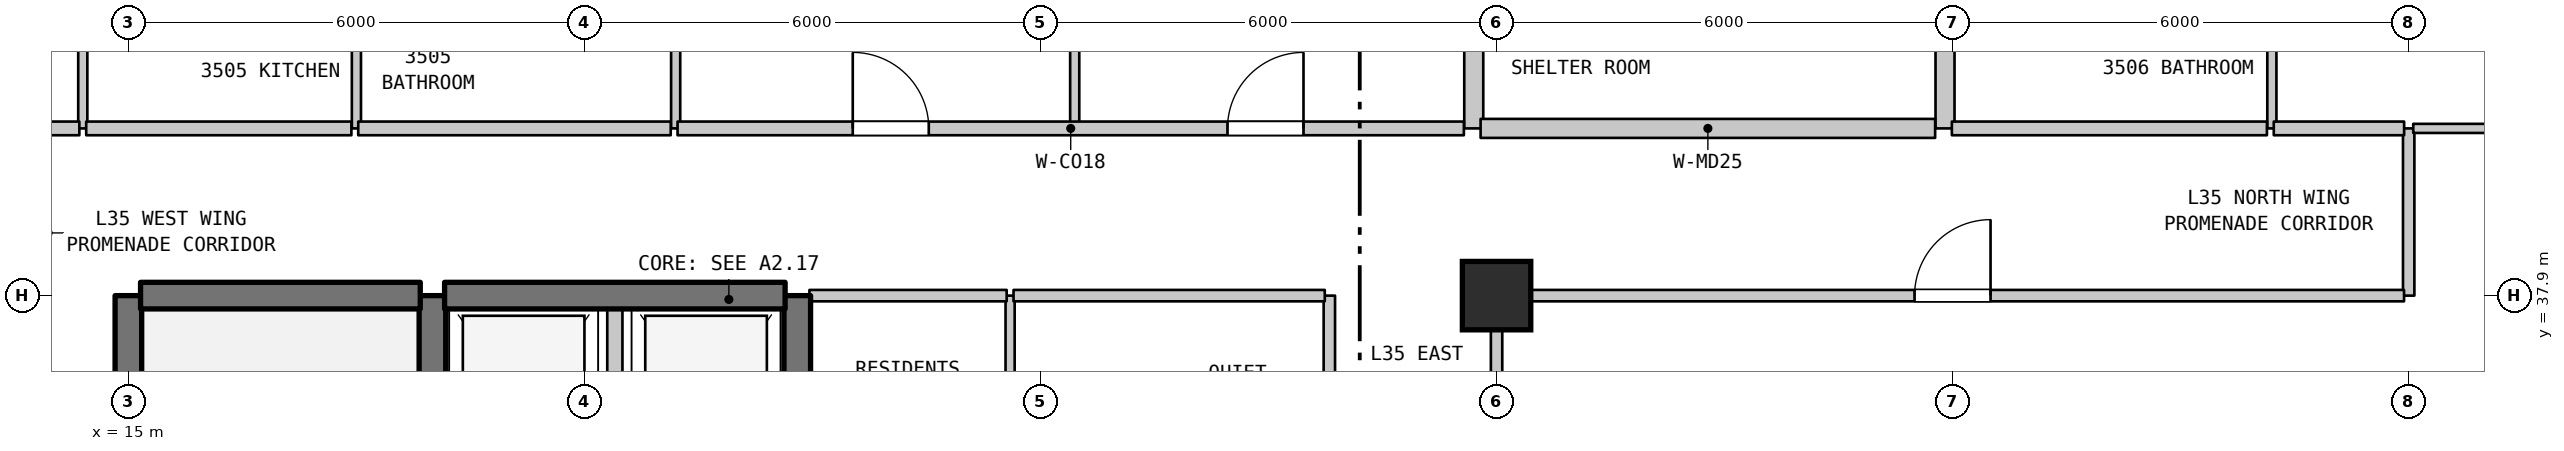
"""IFC4 building model, lengths in metres.
Left out: names, types, materials, properties, quantities, classifications, styles, units other than length and angle.
Written with IfcOpenShell. Run it as: python <this file> out.ifc"""

import sys

from ifc_helpers import new_model, si_unit, direction, frame, frame_2d, origin, origin_2d, place, context, subcontext, project, spatial, rectangle, extrude, element, fill, save


model = new_model("IFC4")
c1 = context("Model", 3, precision=1e-05, world=origin(), true_north=direction((0.0, 1.0)))
c2 = subcontext(c1, "Body", "Model", "MODEL_VIEW")
j1 = project(units=[si_unit("LENGTHUNIT", "METRE"), si_unit("PLANEANGLEUNIT", "RADIAN")], contexts=[c1])
p1 = place(None, origin())
s1 = spatial("IfcSite", under=j1, at=p1, CompositionType="ELEMENT")
p2 = place(p1, origin())
s2 = spatial("IfcBuilding", under=s1, at=p2, CompositionType="ELEMENT")
p3 = place(p2, frame((0.0, 0.0, 144.6)))
s3 = spatial("IfcBuildingStorey", under=s2, at=p3, CompositionType="ELEMENT", Elevation=144.6)
p4 = place(p3, frame((33.0, 37.9, 0.0), z_axis=(0.0, 0.0, 1.0), x_axis=(1.0, 0.0, 0.0)))
e1 = element("IfcColumn", 1, at=p4, inside=s3, PredefinedType="COLUMN", context=c2, shape_type="SweptSolid", body=[
    extrude(rectangle(XDim=0.9, YDim=0.9, at=origin_2d()), origin(), (0.0, 0.0, 1.0), 3.7),
])
p5 = place(p3, frame((14.4, 40.1, 0.0), z_axis=(0.0, 0.0, 1.0), x_axis=(0.0, 1.0, 0.0)))
e2 = element("IfcWall", 2, at=p5, inside=s3, PredefinedType="PARTITIONING", context=c2, shape_type="SweptSolid", body=[
    extrude(rectangle(XDim=2.3, YDim=0.12, at=frame_2d((1.15, 0.0))), origin(), (0.0, 0.0, 1.0), 3.385),
])
p6 = place(p3, frame((15.0, 31.1, 0.0), z_axis=(0.0, 0.0, 1.0), x_axis=(0.0, 1.0, 0.0)))
e3 = element("IfcWall", 3, at=p6, inside=s3, PredefinedType="SHEAR", context=c2, shape_type="SweptSolid", body=[
    extrude(rectangle(XDim=6.8, YDim=0.35, at=frame_2d((3.4, 0.0))), origin(), (0.0, 0.0, 1.0), 3.385),
])
p7 = place(p3, frame((18.0, 40.1, 0.0), z_axis=(0.0, 0.0, 1.0), x_axis=(0.0, 1.0, 0.0)))
e4 = element("IfcWall", 4, at=p7, inside=s3, PredefinedType="PARTITIONING", context=c2, shape_type="SweptSolid", body=[
    extrude(rectangle(XDim=2.3, YDim=0.12, at=frame_2d((1.15, 0.0))), origin(), (0.0, 0.0, 1.0), 3.385),
])
p8 = place(p3, frame((19.0, 35.0, 0.0), z_axis=(0.0, 0.0, 1.0), x_axis=(0.0, 1.0, 0.0)))
e5 = element("IfcWall", 5, at=p8, inside=s3, PredefinedType="SHEAR", context=c2, shape_type="SweptSolid", body=[
    extrude(rectangle(XDim=2.9, YDim=0.35, at=frame_2d((1.45, 0.0))), origin(), (0.0, 0.0, 1.0), 3.385),
])
p9 = place(p3, frame((21.4, 35.0, 0.0), z_axis=(0.0, 0.0, 1.0), x_axis=(0.0, 1.0, 0.0)))
e6 = element("IfcWall", 6, at=p9, inside=s3, PredefinedType="STANDARD", context=c2, shape_type="SweptSolid", body=[
    extrude(rectangle(XDim=2.9, YDim=0.2, at=frame_2d((1.45, 0.0))), origin(), (0.0, 0.0, 1.0), 3.385),
])
p10 = place(p3, frame((22.2, 40.1, 0.0), z_axis=(0.0, 0.0, 1.0), x_axis=(0.0, 1.0, 0.0)))
e7 = element("IfcWall", 7, at=p10, inside=s3, PredefinedType="PARTITIONING", context=c2, shape_type="SweptSolid", body=[
    extrude(rectangle(XDim=2.3, YDim=0.12, at=frame_2d((1.15, 0.0))), origin(), (0.0, 0.0, 1.0), 3.385),
])
p11 = place(p3, frame((23.8, 35.0, 0.0), z_axis=(0.0, 0.0, 1.0), x_axis=(0.0, 1.0, 0.0)))
e8 = element("IfcWall", 8, at=p11, inside=s3, PredefinedType="SHEAR", context=c2, shape_type="SweptSolid", body=[
    extrude(rectangle(XDim=2.9, YDim=0.35, at=frame_2d((1.45, 0.0))), origin(), (0.0, 0.0, 1.0), 3.385),
])
p12 = place(p3, frame((26.6, 35.0, 0.0), z_axis=(0.0, 0.0, 1.0), x_axis=(0.0, 1.0, 0.0)))
e9 = element("IfcWall", 9, at=p12, inside=s3, PredefinedType="PARTITIONING", context=c2, shape_type="SweptSolid", body=[
    extrude(rectangle(XDim=2.9, YDim=0.12, at=frame_2d((1.45, 0.0))), origin(), (0.0, 0.0, 1.0), 3.385),
])
p13 = place(p3, frame((27.45, 40.1, 0.0), z_axis=(0.0, 0.0, 1.0), x_axis=(0.0, 1.0, 0.0)))
e10 = element("IfcWall", 10, at=p13, inside=s3, PredefinedType="PARTITIONING", context=c2, shape_type="SweptSolid", body=[
    extrude(rectangle(XDim=2.05, YDim=0.12, at=frame_2d((1.025, 0.0))), origin(), (0.0, 0.0, 1.0), 3.385),
])
p14 = place(p3, frame((30.8, 35.0, 0.0), z_axis=(0.0, 0.0, 1.0), x_axis=(0.0, 1.0, 0.0)))
e11 = element("IfcWall", 11, at=p14, inside=s3, PredefinedType="STANDARD", context=c2, shape_type="SweptSolid", body=[
    extrude(rectangle(XDim=2.9, YDim=0.15, at=frame_2d((1.45, 0.0))), origin(), (0.0, 0.0, 1.0), 3.385),
])
p15 = place(p3, frame((32.7, 40.1, 0.0), z_axis=(0.0, 0.0, 1.0), x_axis=(0.0, 1.0, 0.0)))
e12 = element("IfcWall", 12, at=p15, inside=s3, PredefinedType="STANDARD", context=c2, shape_type="SweptSolid", body=[
    extrude(rectangle(XDim=2.3, YDim=0.25, at=frame_2d((1.15, 0.0))), origin(), (0.0, 0.0, 1.0), 3.385),
])
p16 = place(p3, frame((33.0, 32.54, 0.0), z_axis=(0.0, 0.0, 1.0), x_axis=(0.0, 1.0, 0.0)))
e13 = element("IfcWall", 13, at=p16, inside=s3, PredefinedType="STANDARD", context=c2, shape_type="SweptSolid", body=[
    extrude(rectangle(XDim=5.36, YDim=0.15, at=frame_2d((2.68, 0.0))), origin(), (0.0, 0.0, 1.0), 2.885),
])
p17 = place(p16, frame((2.109, 0.0, 0.0)))
e14 = element("IfcOpeningElement", 14, at=p17, cuts=e13, PredefinedType="OPENING", context=c2, shape_type="SweptSolid", body=[
    extrude(rectangle(XDim=1.0, YDim=2.15, at=frame_2d((0.5, 1.075))), frame((0.0, 0.085, 0.0), z_axis=(0.0, -1.0, 0.0), x_axis=(1.0, 0.0, 0.0)), (0.0, 0.0, 1.0), 0.17),
])
p18 = place(p3, frame((38.9, 40.1, 0.0), z_axis=(0.0, 0.0, 1.0), x_axis=(0.0, 1.0, 0.0)))
e15 = element("IfcWall", 15, at=p18, inside=s3, PredefinedType="STANDARD", context=c2, shape_type="SweptSolid", body=[
    extrude(rectangle(XDim=2.3, YDim=0.25, at=frame_2d((1.15, 0.0))), origin(), (0.0, 0.0, 1.0), 3.385),
])
p19 = place(p3, frame((43.2, 40.1, 0.0), z_axis=(0.0, 0.0, 1.0), x_axis=(0.0, 1.0, 0.0)))
e16 = element("IfcWall", 16, at=p19, inside=s3, PredefinedType="PARTITIONING", context=c2, shape_type="SweptSolid", body=[
    extrude(rectangle(XDim=2.3, YDim=0.12, at=frame_2d((1.15, 0.0))), origin(), (0.0, 0.0, 1.0), 3.385),
])
p20 = place(p3, frame((45.0, 37.9, 0.0), z_axis=(0.0, 0.0, 1.0), x_axis=(0.0, 1.0, 0.0)))
e17 = element("IfcWall", 17, at=p20, inside=s3, PredefinedType="STANDARD", context=c2, shape_type="SweptSolid", body=[
    extrude(rectangle(XDim=2.2, YDim=0.15, at=frame_2d((1.1, 0.0))), origin(), (0.0, 0.0, 1.0), 3.385),
])
p21 = place(p3, frame((15.16, 37.9, 0.0), z_axis=(0.0, 0.0, 1.0), x_axis=(1.0, 0.0, 0.0)))
e18 = element("IfcWall", 18, at=p21, inside=s3, PredefinedType="SHEAR", context=c2, shape_type="SweptSolid", body=[
    extrude(rectangle(XDim=3.68, YDim=0.35, at=frame_2d((1.84, 0.0))), origin(), (0.0, 0.0, 1.0), 3.385),
])
p22 = place(p3, frame((19.16, 37.9, 0.0), z_axis=(0.0, 0.0, 1.0), x_axis=(1.0, 0.0, 0.0)))
e19 = element("IfcWall", 19, at=p22, inside=s3, PredefinedType="SHEAR", context=c2, shape_type="SweptSolid", body=[
    extrude(rectangle(XDim=4.48, YDim=0.35, at=frame_2d((2.24, 0.0))), origin(), (0.0, 0.0, 1.0), 3.385),
])
p23 = place(p3, frame((23.96, 37.9, 0.0), z_axis=(0.0, 0.0, 1.0), x_axis=(1.0, 0.0, 0.0)))
e20 = element("IfcWall", 20, at=p23, inside=s3, PredefinedType="STANDARD", context=c2, shape_type="SweptSolid", body=[
    extrude(rectangle(XDim=2.595, YDim=0.15, at=frame_2d((1.297, 0.0))), origin(), (0.0, 0.0, 1.0), 2.885),
])
p24 = place(p3, frame((26.645, 37.9, 0.0), z_axis=(0.0, 0.0, 1.0), x_axis=(1.0, 0.0, 0.0)))
e21 = element("IfcWall", 21, at=p24, inside=s3, PredefinedType="STANDARD", context=c2, shape_type="SweptSolid", body=[
    extrude(rectangle(XDim=4.095, YDim=0.15, at=frame_2d((2.047, 0.0))), origin(), (0.0, 0.0, 1.0), 2.885),
])
p25 = place(p3, frame((33.06, 37.9, 0.0), z_axis=(0.0, 0.0, 1.0), x_axis=(1.0, 0.0, 0.0)))
e22 = element("IfcWall", 22, at=p25, inside=s3, PredefinedType="STANDARD", context=c2, shape_type="SweptSolid", body=[
    extrude(rectangle(XDim=11.879, YDim=0.15, at=frame_2d((5.939, 0.0))), origin(), (0.0, 0.0, 1.0), 3.385),
])
p26 = place(p25, frame((5.439, 0.0, 0.0)))
e23 = element("IfcOpeningElement", 23, at=p26, cuts=e22, PredefinedType="OPENING", context=c2, shape_type="SweptSolid", body=[
    extrude(rectangle(XDim=1.0, YDim=2.15, at=frame_2d((0.5, 1.075))), frame((0.0, 0.085, 0.0), z_axis=(0.0, -1.0, 0.0), x_axis=(1.0, 0.0, 0.0)), (0.0, 0.0, 1.0), 0.17),
])
p27 = place(p3, frame((12.875, 40.1, 0.0), z_axis=(0.0, 0.0, 1.0), x_axis=(1.0, 0.0, 0.0)))
e24 = element("IfcWall", 24, at=p27, inside=s3, PredefinedType="STANDARD", context=c2, shape_type="SweptSolid", body=[
    extrude(rectangle(XDim=1.48, YDim=0.18, at=frame_2d((0.74, 0.0))), origin(), (0.0, 0.0, 1.0), 3.385),
])
p28 = place(p3, frame((14.445, 40.1, 0.0), z_axis=(0.0, 0.0, 1.0), x_axis=(1.0, 0.0, 0.0)))
e25 = element("IfcWall", 25, at=p28, inside=s3, PredefinedType="STANDARD", context=c2, shape_type="SweptSolid", body=[
    extrude(rectangle(XDim=3.489, YDim=0.18, at=frame_2d((1.745, 0.0))), origin(), (0.0, 0.0, 1.0), 3.385),
])
p29 = place(p3, frame((18.024, 40.1, 0.0), z_axis=(0.0, 0.0, 1.0), x_axis=(1.0, 0.0, 0.0)))
e26 = element("IfcWall", 26, at=p29, inside=s3, PredefinedType="STANDARD", context=c2, shape_type="SweptSolid", body=[
    extrude(rectangle(XDim=4.111, YDim=0.18, at=frame_2d((2.056, 0.0))), origin(), (0.0, 0.0, 1.0), 3.385),
])
p30 = place(p3, frame((22.225, 40.1, 0.0), z_axis=(0.0, 0.0, 1.0), x_axis=(1.0, 0.0, 0.0)))
e27 = element("IfcWall", 27, at=p30, inside=s3, PredefinedType="STANDARD", context=c2, shape_type="SweptSolid", body=[
    extrude(rectangle(XDim=10.345, YDim=0.18, at=frame_2d((5.172, 0.0))), origin(), (0.0, 0.0, 1.0), 3.385),
])
p31 = place(p30, frame((2.305, 0.0, 0.0)))
e28 = element("IfcOpeningElement", 28, at=p31, cuts=e27, PredefinedType="OPENING", context=c2, shape_type="SweptSolid", body=[
    extrude(rectangle(XDim=1.0, YDim=2.15, at=frame_2d((0.5, 1.075))), frame((0.0, 0.1, 0.0), z_axis=(0.0, -1.0, 0.0), x_axis=(1.0, 0.0, 0.0)), (0.0, 0.0, 1.0), 0.2),
])
p32 = place(p30, frame((7.235, 0.0, 0.0)))
e29 = element("IfcOpeningElement", 29, at=p32, cuts=e27, PredefinedType="OPENING", context=c2, shape_type="SweptSolid", body=[
    extrude(rectangle(XDim=1.0, YDim=2.15, at=frame_2d((0.5, 1.075))), frame((0.0, 0.1, 0.0), z_axis=(0.0, -1.0, 0.0), x_axis=(1.0, 0.0, 0.0)), (0.0, 0.0, 1.0), 0.2),
])
p33 = place(p3, frame((32.79, 40.1, 0.0), z_axis=(0.0, 0.0, 1.0), x_axis=(1.0, 0.0, 0.0)))
e30 = element("IfcWall", 30, at=p33, inside=s3, PredefinedType="STANDARD", context=c2, shape_type="SweptSolid", body=[
    extrude(rectangle(XDim=5.98, YDim=0.25, at=frame_2d((2.99, 0.0))), origin(), (0.0, 0.0, 1.0), 3.385),
])
p34 = place(p3, frame((38.99, 40.1, 0.0), z_axis=(0.0, 0.0, 1.0), x_axis=(1.0, 0.0, 0.0)))
e31 = element("IfcWall", 31, at=p34, inside=s3, PredefinedType="STANDARD", context=c2, shape_type="SweptSolid", body=[
    extrude(rectangle(XDim=4.145, YDim=0.18, at=frame_2d((2.073, 0.0))), origin(), (0.0, 0.0, 1.0), 3.385),
])
p35 = place(p3, frame((43.225, 40.1, 0.0), z_axis=(0.0, 0.0, 1.0), x_axis=(1.0, 0.0, 0.0)))
e32 = element("IfcWall", 32, at=p35, inside=s3, PredefinedType="STANDARD", context=c2, shape_type="SweptSolid", body=[
    extrude(rectangle(XDim=1.715, YDim=0.18, at=frame_2d((0.857, 0.0))), origin(), (0.0, 0.0, 1.0), 3.385),
])
p36 = place(p3, frame((45.06, 40.1, 0.0), z_axis=(0.0, 0.0, 1.0), x_axis=(1.0, 0.0, 0.0)))
e33 = element("IfcWall", 33, at=p36, inside=s3, PredefinedType="PARTITIONING", context=c2, shape_type="SweptSolid", body=[
    extrude(rectangle(XDim=12.932, YDim=0.12, at=frame_2d((6.466, 0.0))), origin(), (0.0, 0.0, 1.0), 3.385),
])
p37 = place(p26, origin())
e34 = element("IfcDoor", 34, at=p37, inside=s3, OperationType="SINGLE_SWING_RIGHT", PredefinedType="DOOR", context=c2, shape_type="SweptSolid", body=[
    extrude(rectangle(XDim=1.0, YDim=2.15, at=frame_2d((0.5, 1.075))), frame((0.0, 0.025, 0.0), z_axis=(0.0, -1.0, 0.0), x_axis=(1.0, 0.0, 0.0)), (0.0, 0.0, 1.0), 0.05),
])
fill(e23, e34)
p38 = place(p31, origin())
e35 = element("IfcDoor", 35, at=p38, inside=s3, OperationType="SINGLE_SWING_LEFT", PredefinedType="DOOR", context=c2, shape_type="SweptSolid", body=[
    extrude(rectangle(XDim=1.0, YDim=2.15, at=frame_2d((0.5, 1.075))), frame((0.0, 0.025, 0.0), z_axis=(0.0, -1.0, 0.0), x_axis=(1.0, 0.0, 0.0)), (0.0, 0.0, 1.0), 0.05),
])
fill(e28, e35)
p39 = place(p32, origin())
e36 = element("IfcDoor", 36, at=p39, inside=s3, OperationType="SINGLE_SWING_RIGHT", PredefinedType="DOOR", context=c2, shape_type="SweptSolid", body=[
    extrude(rectangle(XDim=1.0, YDim=2.15, at=frame_2d((0.5, 1.075))), frame((0.0, 0.025, 0.0), z_axis=(0.0, -1.0, 0.0), x_axis=(1.0, 0.0, 0.0)), (0.0, 0.0, 1.0), 0.05),
])
fill(e29, e36)
save(model, sys.argv[1])
